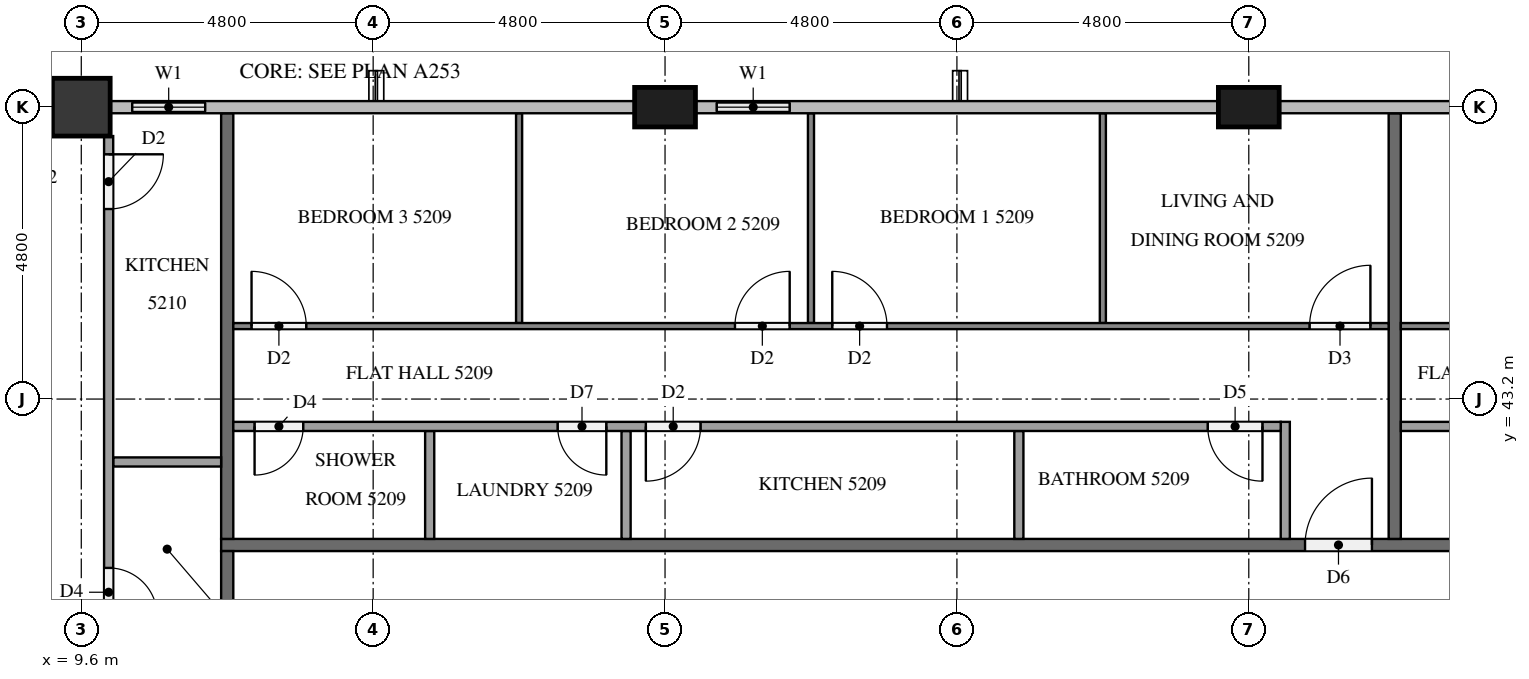
"""IFC4 building model, lengths in metres.
Left out: names, types, materials, properties, quantities, classifications, styles, units other than length and angle.
Written with IfcOpenShell. Run it as: python <this file> out.ifc"""

import sys

from ifc_helpers import new_model, si_unit, direction, frame, frame_2d, origin, origin_2d, place, context, subcontext, project, spatial, rectangle, extrude, element, fill, save


model = new_model("IFC4")
c1 = context("Model", 3, precision=1e-05, world=origin(), true_north=direction((0.0, 1.0)))
c2 = subcontext(c1, "Body", "Model", "MODEL_VIEW")
j1 = project(units=[si_unit("LENGTHUNIT", "METRE"), si_unit("PLANEANGLEUNIT", "RADIAN")], contexts=[c1])
p1 = place(None, origin())
s1 = spatial("IfcSite", under=j1, at=p1, CompositionType="ELEMENT")
p2 = place(p1, origin())
s2 = spatial("IfcBuilding", under=s1, at=p2, CompositionType="ELEMENT")
p3 = place(p2, frame((0.0, 0.0, 199.9)))
s3 = spatial("IfcBuildingStorey", under=s2, at=p3, CompositionType="ELEMENT", Elevation=199.9)
for number, where, z_axis, x_axis in (
    (1, (28.8, 48.0, 0.0), (0.0, 0.0, 1.0), (1.0, 0.0, 0.0)),
    (2, (19.2, 48.0, 0.0), (0.0, 0.0, 1.0), (1.0, 0.0, 0.0)),
):
    element("IfcColumn", number, at=place(p3, frame(where, z_axis=z_axis, x_axis=x_axis)), inside=s3, PredefinedType="COLUMN", context=c2, shape_type="SweptSolid", body=[
        extrude(rectangle(XDim=1.0, YDim=0.65, at=origin_2d()), origin(), (0.0, 0.0, 1.0), 3.1),
    ])
p4 = place(p3, frame((9.6, 48.0, 0.0), z_axis=(0.0, 0.0, 1.0), x_axis=(1.0, 0.0, 0.0)))
e3 = element("IfcColumn", 3, at=p4, inside=s3, PredefinedType="COLUMN", context=c2, shape_type="SweptSolid", body=[
    extrude(rectangle(XDim=0.95, YDim=0.95, at=origin_2d()), origin(), (0.0, 0.0, 1.0), 3.1),
])
p5 = place(p3, frame((21.6, 48.0, 0.0), z_axis=(0.0, 0.0, 1.0), x_axis=(-1.0, 0.0, 0.0)))
e4 = element("IfcWall", 4, at=p5, inside=s3, PredefinedType="SOLIDWALL", context=c2, shape_type="SweptSolid", body=[
    extrude(rectangle(XDim=1.9, YDim=0.15, at=frame_2d((0.95, 0.0))), origin(), (0.0, 0.0, 1.0), 3.1),
])
p6 = place(p5, frame((0.35, 0.0, 0.9)))
e5 = element("IfcOpeningElement", 5, at=p6, cuts=e4, PredefinedType="OPENING", context=c2, shape_type="SweptSolid", body=[
    extrude(rectangle(XDim=1.2, YDim=1.4, at=frame_2d((0.6, 0.7))), frame((0.0, 0.085, 0.0), z_axis=(0.0, -1.0, 0.0), x_axis=(1.0, 0.0, 0.0)), (0.0, 0.0, 1.0), 0.17),
])
p7 = place(p3, frame((12.0, 48.0, 0.0), z_axis=(0.0, 0.0, 1.0), x_axis=(-1.0, 0.0, 0.0)))
e6 = element("IfcWall", 6, at=p7, inside=s3, PredefinedType="SOLIDWALL", context=c2, shape_type="SweptSolid", body=[
    extrude(rectangle(XDim=1.925, YDim=0.15, at=frame_2d((0.962, 0.0))), origin(), (0.0, 0.0, 1.0), 3.1),
])
p8 = place(p7, frame((0.363, 0.0, 0.9)))
e7 = element("IfcOpeningElement", 7, at=p8, cuts=e6, PredefinedType="OPENING", context=c2, shape_type="SweptSolid", body=[
    extrude(rectangle(XDim=1.2, YDim=1.4, at=frame_2d((0.6, 0.7))), frame((0.0, 0.085, 0.0), z_axis=(0.0, -1.0, 0.0), x_axis=(1.0, 0.0, 0.0)), (0.0, 0.0, 1.0), 0.17),
])
p9 = place(p3, frame((11.9, 40.8, 0.0), z_axis=(0.0, 0.0, 1.0), x_axis=(1.0, 0.0, 0.0)))
e8 = element("IfcWall", 8, at=p9, inside=s3, PredefinedType="PARTITIONING", context=c2, shape_type="SweptSolid", body=[
    extrude(rectangle(XDim=38.6, YDim=0.2, at=frame_2d((19.3, 0.0))), origin(), (0.0, 0.0, 1.0), 3.1),
])
p10 = place(p9, frame((37.025, 0.0, 0.0)))
e9 = element("IfcOpeningElement", 9, at=p10, cuts=e8, PredefinedType="OPENING", context=c2, shape_type="SweptSolid", body=[
    extrude(rectangle(XDim=1.1, YDim=2.1, at=frame_2d((0.55, 1.05))), frame((0.0, 0.11, 0.0), z_axis=(0.0, -1.0, 0.0), x_axis=(1.0, 0.0, 0.0)), (0.0, 0.0, 1.0), 0.22),
])
p11 = place(p9, frame((17.825, 0.0, 0.0)))
e10 = element("IfcOpeningElement", 10, at=p11, cuts=e8, PredefinedType="OPENING", context=c2, shape_type="SweptSolid", body=[
    extrude(rectangle(XDim=1.1, YDim=2.1, at=frame_2d((0.55, 1.05))), frame((0.0, 0.11, 0.0), z_axis=(0.0, -1.0, 0.0), x_axis=(1.0, 0.0, 0.0)), (0.0, 0.0, 1.0), 0.22),
])
p12 = place(p3, frame((12.0, 12.1, 0.0), z_axis=(0.0, 0.0, 1.0), x_axis=(0.0, 1.0, 0.0)))
e11 = element("IfcWall", 11, at=p12, inside=s3, PredefinedType="PARTITIONING", context=c2, shape_type="SweptSolid", body=[
    extrude(rectangle(XDim=28.6, YDim=0.2, at=frame_2d((14.3, 0.0))), origin(), (0.0, 0.0, 1.0), 3.1),
])
p13 = place(p12, frame((21.925, 0.0, 0.0)))
e12 = element("IfcOpeningElement", 12, at=p13, cuts=e11, PredefinedType="OPENING", context=c2, shape_type="SweptSolid", body=[
    extrude(rectangle(XDim=1.0, YDim=2.1, at=frame_2d((0.5, 1.05))), frame((0.0, 0.11, 0.0), z_axis=(0.0, -1.0, 0.0), x_axis=(1.0, 0.0, 0.0)), (0.0, 0.0, 1.0), 0.22),
])
p14 = place(p12, frame((14.725, 0.0, 0.0)))
e13 = element("IfcOpeningElement", 13, at=p14, cuts=e11, PredefinedType="OPENING", context=c2, shape_type="SweptSolid", body=[
    extrude(rectangle(XDim=1.0, YDim=2.1, at=frame_2d((0.5, 1.05))), frame((0.0, 0.11, 0.0), z_axis=(0.0, -1.0, 0.0), x_axis=(1.0, 0.0, 0.0)), (0.0, 0.0, 1.0), 0.22),
])
p15 = place(p12, frame((12.875, 0.0, 0.0)))
e14 = element("IfcOpeningElement", 14, at=p15, cuts=e11, PredefinedType="OPENING", context=c2, shape_type="SweptSolid", body=[
    extrude(rectangle(XDim=1.0, YDim=2.1, at=frame_2d((0.5, 1.05))), frame((0.0, 0.11, 0.0), z_axis=(0.0, -1.0, 0.0), x_axis=(1.0, 0.0, 0.0)), (0.0, 0.0, 1.0), 0.22),
])
for number, where, z_axis, x_axis in (
    (15, (31.2, 47.9, 0.0), (0.0, 0.0, 1.0), (0.0, -1.0, 0.0)),
    (16, (12.0, 47.9, 0.0), (0.0, 0.0, 1.0), (0.0, -1.0, 0.0)),
):
    element("IfcWall", number, at=place(p3, frame(where, z_axis=z_axis, x_axis=x_axis)), inside=s3, PredefinedType="PARTITIONING", context=c2, shape_type="SweptSolid", body=[
        extrude(rectangle(XDim=7.0, YDim=0.2, at=frame_2d((3.5, 0.0))), origin(), (0.0, 0.0, 1.0), 3.1),
    ])
p16 = place(p3, frame((31.3, 44.4, 0.0), z_axis=(0.0, 0.0, 1.0), x_axis=(1.0, 0.0, 0.0)))
e17 = element("IfcWall", 17, at=p16, inside=s3, PredefinedType="PARTITIONING", context=c2, shape_type="SweptSolid", body=[
    extrude(rectangle(XDim=19.0, YDim=0.1, at=frame_2d((9.5, 0.0))), origin(), (0.0, 0.0, 1.0), 3.1),
])
p17 = place(p16, frame((14.65, 0.0, 0.0)))
e18 = element("IfcOpeningElement", 18, at=p17, cuts=e17, PredefinedType="OPENING", context=c2, shape_type="SweptSolid", body=[
    extrude(rectangle(XDim=0.9, YDim=2.1, at=frame_2d((0.45, 1.05))), frame((0.0, 0.06, 0.0), z_axis=(0.0, -1.0, 0.0), x_axis=(1.0, 0.0, 0.0)), (0.0, 0.0, 1.0), 0.12),
])
p18 = place(p16, frame((12.95, 0.0, 0.0)))
e19 = element("IfcOpeningElement", 19, at=p18, cuts=e17, PredefinedType="OPENING", context=c2, shape_type="SweptSolid", body=[
    extrude(rectangle(XDim=1.0, YDim=2.1, at=frame_2d((0.5, 1.05))), frame((0.0, 0.06, 0.0), z_axis=(0.0, -1.0, 0.0), x_axis=(1.0, 0.0, 0.0)), (0.0, 0.0, 1.0), 0.12),
])
p19 = place(p16, frame((5.05, 0.0, 0.0)))
e20 = element("IfcOpeningElement", 20, at=p19, cuts=e17, PredefinedType="OPENING", context=c2, shape_type="SweptSolid", body=[
    extrude(rectangle(XDim=0.9, YDim=2.1, at=frame_2d((0.45, 1.05))), frame((0.0, 0.06, 0.0), z_axis=(0.0, -1.0, 0.0), x_axis=(1.0, 0.0, 0.0)), (0.0, 0.0, 1.0), 0.12),
])
p20 = place(p16, frame((3.45, 0.0, 0.0)))
e21 = element("IfcOpeningElement", 21, at=p20, cuts=e17, PredefinedType="OPENING", context=c2, shape_type="SweptSolid", body=[
    extrude(rectangle(XDim=0.9, YDim=2.1, at=frame_2d((0.45, 1.05))), frame((0.0, 0.06, 0.0), z_axis=(0.0, -1.0, 0.0), x_axis=(1.0, 0.0, 0.0)), (0.0, 0.0, 1.0), 0.12),
])
p21 = place(p3, frame((48.525, 42.75, 0.0), z_axis=(0.0, 0.0, 1.0), x_axis=(-1.0, 0.0, 0.0)))
e22 = element("IfcWall", 22, at=p21, inside=s3, PredefinedType="PARTITIONING", context=c2, shape_type="SweptSolid", body=[
    extrude(rectangle(XDim=17.225, YDim=0.15, at=frame_2d((8.612, 0.0))), origin(), (0.0, 0.0, 1.0), 3.1),
])
p22 = place(p21, frame((3.081, 0.0, 0.0)))
e23 = element("IfcOpeningElement", 23, at=p22, cuts=e22, PredefinedType="OPENING", context=c2, shape_type="SweptSolid", body=[
    extrude(rectangle(XDim=0.9, YDim=2.1, at=frame_2d((0.45, 1.05))), frame((0.0, 0.085, 0.0), z_axis=(0.0, -1.0, 0.0), x_axis=(1.0, 0.0, 0.0)), (0.0, 0.0, 1.0), 0.17),
])
p23 = place(p21, frame((4.631, 0.0, 0.0)))
e24 = element("IfcOpeningElement", 24, at=p23, cuts=e22, PredefinedType="OPENING", context=c2, shape_type="SweptSolid", body=[
    extrude(rectangle(XDim=0.8, YDim=2.1, at=frame_2d((0.4, 1.05))), frame((0.0, 0.085, 0.0), z_axis=(0.0, -1.0, 0.0), x_axis=(1.0, 0.0, 0.0)), (0.0, 0.0, 1.0), 0.17),
])
p24 = place(p21, frame((9.641, 0.0, 0.0)))
e25 = element("IfcOpeningElement", 25, at=p24, cuts=e22, PredefinedType="OPENING", context=c2, shape_type="SweptSolid", body=[
    extrude(rectangle(XDim=0.8, YDim=2.1, at=frame_2d((0.4, 1.05))), frame((0.0, 0.085, 0.0), z_axis=(0.0, -1.0, 0.0), x_axis=(1.0, 0.0, 0.0)), (0.0, 0.0, 1.0), 0.17),
])
p25 = place(p21, frame((11.091, 0.0, 0.0)))
e26 = element("IfcOpeningElement", 26, at=p25, cuts=e22, PredefinedType="OPENING", context=c2, shape_type="SweptSolid", body=[
    extrude(rectangle(XDim=0.9, YDim=2.1, at=frame_2d((0.45, 1.05))), frame((0.0, 0.085, 0.0), z_axis=(0.0, -1.0, 0.0), x_axis=(1.0, 0.0, 0.0)), (0.0, 0.0, 1.0), 0.17),
])
for number, where, z_axis, x_axis in (
    (27, (26.4, 44.45, 0.0), (0.0, 0.0, 1.0), (0.0, 1.0, 0.0)),
    (28, (21.6, 44.45, 0.0), (0.0, 0.0, 1.0), (0.0, 1.0, 0.0)),
    (29, (16.8, 44.45, 0.0), (0.0, 0.0, 1.0), (0.0, 1.0, 0.0)),
):
    element("IfcWall", number, at=place(p3, frame(where, z_axis=z_axis, x_axis=x_axis)), inside=s3, PredefinedType="PARTITIONING", context=c2, shape_type="SweptSolid", body=[
        extrude(rectangle(XDim=3.45, YDim=0.1, at=frame_2d((1.725, 0.0))), origin(), (0.0, 0.0, 1.0), 3.1),
    ])
p26 = place(p3, frame((12.1, 44.4, 0.0), z_axis=(0.0, 0.0, 1.0), x_axis=(1.0, 0.0, 0.0)))
e30 = element("IfcWall", 30, at=p26, inside=s3, PredefinedType="PARTITIONING", context=c2, shape_type="SweptSolid", body=[
    extrude(rectangle(XDim=19.0, YDim=0.1, at=frame_2d((9.5, 0.0))), origin(), (0.0, 0.0, 1.0), 3.1),
])
p27 = place(p26, frame((17.7, 0.0, 0.0)))
e31 = element("IfcOpeningElement", 31, at=p27, cuts=e30, PredefinedType="OPENING", context=c2, shape_type="SweptSolid", body=[
    extrude(rectangle(XDim=1.0, YDim=2.1, at=frame_2d((0.5, 1.05))), frame((0.0, 0.06, 0.0), z_axis=(0.0, -1.0, 0.0), x_axis=(1.0, 0.0, 0.0)), (0.0, 0.0, 1.0), 0.12),
])
p28 = place(p26, frame((9.85, 0.0, 0.0)))
e32 = element("IfcOpeningElement", 32, at=p28, cuts=e30, PredefinedType="OPENING", context=c2, shape_type="SweptSolid", body=[
    extrude(rectangle(XDim=0.9, YDim=2.1, at=frame_2d((0.45, 1.05))), frame((0.0, 0.06, 0.0), z_axis=(0.0, -1.0, 0.0), x_axis=(1.0, 0.0, 0.0)), (0.0, 0.0, 1.0), 0.12),
])
p29 = place(p26, frame((8.25, 0.0, 0.0)))
e33 = element("IfcOpeningElement", 33, at=p29, cuts=e30, PredefinedType="OPENING", context=c2, shape_type="SweptSolid", body=[
    extrude(rectangle(XDim=0.9, YDim=2.1, at=frame_2d((0.45, 1.05))), frame((0.0, 0.06, 0.0), z_axis=(0.0, -1.0, 0.0), x_axis=(1.0, 0.0, 0.0)), (0.0, 0.0, 1.0), 0.12),
])
p30 = place(p26, frame((0.3, 0.0, 0.0)))
e34 = element("IfcOpeningElement", 34, at=p30, cuts=e30, PredefinedType="OPENING", context=c2, shape_type="SweptSolid", body=[
    extrude(rectangle(XDim=0.9, YDim=2.1, at=frame_2d((0.45, 1.05))), frame((0.0, 0.06, 0.0), z_axis=(0.0, -1.0, 0.0), x_axis=(1.0, 0.0, 0.0)), (0.0, 0.0, 1.0), 0.12),
])
for number, where, z_axis, x_axis in (
    (35, (25.019, 40.9, 0.0), (0.0, 0.0, 1.0), (0.0, 1.0, 0.0)),
    (36, (18.559, 40.9, 0.0), (0.0, 0.0, 1.0), (0.0, 1.0, 0.0)),
    (37, (15.33, 40.9, 0.0), (0.0, 0.0, 1.0), (0.0, 1.0, 0.0)),
):
    element("IfcWall", number, at=place(p3, frame(where, z_axis=z_axis, x_axis=x_axis)), inside=s3, PredefinedType="PARTITIONING", context=c2, shape_type="SweptSolid", body=[
        extrude(rectangle(XDim=1.775, YDim=0.15, at=frame_2d((0.888, 0.0))), origin(), (0.0, 0.0, 1.0), 3.1),
    ])
p31 = place(p3, frame((29.4, 40.9, 0.0), z_axis=(0.0, 0.0, 1.0), x_axis=(0.0, 1.0, 0.0)))
e38 = element("IfcWall", 38, at=p31, inside=s3, PredefinedType="PARTITIONING", context=c2, shape_type="SweptSolid", body=[
    extrude(rectangle(XDim=1.925, YDim=0.15, at=frame_2d((0.962, 0.0))), origin(), (0.0, 0.0, 1.0), 3.1),
])
p32 = place(p3, frame((29.325, 42.75, 0.0), z_axis=(0.0, 0.0, 1.0), x_axis=(-1.0, 0.0, 0.0)))
e39 = element("IfcWall", 39, at=p32, inside=s3, PredefinedType="PARTITIONING", context=c2, shape_type="SweptSolid", body=[
    extrude(rectangle(XDim=17.225, YDim=0.15, at=frame_2d((8.612, 0.0))), origin(), (0.0, 0.0, 1.0), 3.1),
])
p33 = place(p32, frame((0.3, 0.0, 0.0)))
e40 = element("IfcOpeningElement", 40, at=p33, cuts=e39, PredefinedType="OPENING", context=c2, shape_type="SweptSolid", body=[
    extrude(rectangle(XDim=0.9, YDim=2.1, at=frame_2d((0.45, 1.05))), frame((0.0, 0.085, 0.0), z_axis=(0.0, -1.0, 0.0), x_axis=(1.0, 0.0, 0.0)), (0.0, 0.0, 1.0), 0.17),
])
p34 = place(p32, frame((9.541, 0.0, 0.0)))
e41 = element("IfcOpeningElement", 41, at=p34, cuts=e39, PredefinedType="OPENING", context=c2, shape_type="SweptSolid", body=[
    extrude(rectangle(XDim=0.9, YDim=2.1, at=frame_2d((0.45, 1.05))), frame((0.0, 0.085, 0.0), z_axis=(0.0, -1.0, 0.0), x_axis=(1.0, 0.0, 0.0)), (0.0, 0.0, 1.0), 0.17),
])
p35 = place(p32, frame((11.091, 0.0, 0.0)))
e42 = element("IfcOpeningElement", 42, at=p35, cuts=e39, PredefinedType="OPENING", context=c2, shape_type="SweptSolid", body=[
    extrude(rectangle(XDim=0.8, YDim=2.1, at=frame_2d((0.4, 1.05))), frame((0.0, 0.085, 0.0), z_axis=(0.0, -1.0, 0.0), x_axis=(1.0, 0.0, 0.0)), (0.0, 0.0, 1.0), 0.17),
])
p36 = place(p32, frame((16.075, 0.0, 0.0)))
e43 = element("IfcOpeningElement", 43, at=p36, cuts=e39, PredefinedType="OPENING", context=c2, shape_type="SweptSolid", body=[
    extrude(rectangle(XDim=0.8, YDim=2.1, at=frame_2d((0.4, 1.05))), frame((0.0, 0.085, 0.0), z_axis=(0.0, -1.0, 0.0), x_axis=(1.0, 0.0, 0.0)), (0.0, 0.0, 1.0), 0.17),
])
p37 = place(p3, frame((11.9, 42.165, 0.0), z_axis=(0.0, 0.0, 1.0), x_axis=(-1.0, 0.0, 0.0)))
e44 = element("IfcWall", 44, at=p37, inside=s3, PredefinedType="PARTITIONING", context=c2, shape_type="SweptSolid", body=[
    extrude(rectangle(XDim=1.775, YDim=0.15, at=frame_2d((0.887, 0.0))), origin(), (0.0, 0.0, 1.0), 3.1),
])
p38 = place(p3, frame((10.05, 47.525, 0.0), z_axis=(0.0, 0.0, 1.0), x_axis=(0.0, -1.0, 0.0)))
e45 = element("IfcWall", 45, at=p38, inside=s3, PredefinedType="PARTITIONING", context=c2, shape_type="SweptSolid", body=[
    extrude(rectangle(XDim=12.05, YDim=0.15, at=frame_2d((6.025, 0.0))), origin(), (0.0, 0.0, 1.0), 3.1),
])
p39 = place(p38, frame((8.552, 0.0, 0.0)))
e46 = element("IfcOpeningElement", 46, at=p39, cuts=e45, PredefinedType="OPENING", context=c2, shape_type="SweptSolid", body=[
    extrude(rectangle(XDim=0.9, YDim=2.1, at=frame_2d((0.45, 1.05))), frame((0.0, 0.085, 0.0), z_axis=(0.0, -1.0, 0.0), x_axis=(1.0, 0.0, 0.0)), (0.0, 0.0, 1.0), 0.17),
])
p40 = place(p38, frame((7.102, 0.0, 0.0)))
e47 = element("IfcOpeningElement", 47, at=p40, cuts=e45, PredefinedType="OPENING", context=c2, shape_type="SweptSolid", body=[
    extrude(rectangle(XDim=0.8, YDim=2.1, at=frame_2d((0.4, 1.05))), frame((0.0, 0.085, 0.0), z_axis=(0.0, -1.0, 0.0), x_axis=(1.0, 0.0, 0.0)), (0.0, 0.0, 1.0), 0.17),
])
p41 = place(p38, frame((0.3, 0.0, 0.0)))
e48 = element("IfcOpeningElement", 48, at=p41, cuts=e45, PredefinedType="OPENING", context=c2, shape_type="SweptSolid", body=[
    extrude(rectangle(XDim=0.9, YDim=2.1, at=frame_2d((0.45, 1.05))), frame((0.0, 0.085, 0.0), z_axis=(0.0, -1.0, 0.0), x_axis=(1.0, 0.0, 0.0)), (0.0, 0.0, 1.0), 0.17),
])
p42 = place(p6, origin())
e49 = element("IfcWindow", 49, at=p42, inside=s3, PartitioningType="SINGLE_PANEL", PredefinedType="WINDOW", context=c2, shape_type="SweptSolid", body=[
    extrude(rectangle(XDim=1.2, YDim=1.4, at=frame_2d((0.6, 0.7))), frame((0.0, 0.03, 0.0), z_axis=(0.0, -1.0, 0.0), x_axis=(1.0, 0.0, 0.0)), (0.0, 0.0, 1.0), 0.06),
])
fill(e5, e49)
p43 = place(p8, origin())
e50 = element("IfcWindow", 50, at=p43, inside=s3, PartitioningType="SINGLE_PANEL", PredefinedType="WINDOW", context=c2, shape_type="SweptSolid", body=[
    extrude(rectangle(XDim=1.2, YDim=1.4, at=frame_2d((0.6, 0.7))), frame((0.0, 0.03, 0.0), z_axis=(0.0, -1.0, 0.0), x_axis=(1.0, 0.0, 0.0)), (0.0, 0.0, 1.0), 0.06),
])
fill(e7, e50)
p44 = place(p11, origin())
e51 = element("IfcDoor", 51, at=p44, inside=s3, OperationType="SINGLE_SWING_RIGHT", PredefinedType="DOOR", context=c2, shape_type="SweptSolid", body=[
    extrude(rectangle(XDim=1.1, YDim=2.1, at=frame_2d((0.55, 1.05))), frame((0.0, 0.025, 0.0), z_axis=(0.0, -1.0, 0.0), x_axis=(1.0, 0.0, 0.0)), (0.0, 0.0, 1.0), 0.05),
])
fill(e10, e51)
p45 = place(p27, origin())
e52 = element("IfcDoor", 52, at=p45, inside=s3, OperationType="SINGLE_SWING_RIGHT", PredefinedType="DOOR", context=c2, shape_type="SweptSolid", body=[
    extrude(rectangle(XDim=1.0, YDim=2.1, at=frame_2d((0.5, 1.05))), frame((0.0, 0.025, 0.0), z_axis=(0.0, -1.0, 0.0), x_axis=(1.0, 0.0, 0.0)), (0.0, 0.0, 1.0), 0.05),
])
fill(e31, e52)
p46 = place(p28, origin())
e53 = element("IfcDoor", 53, at=p46, inside=s3, OperationType="SINGLE_SWING_LEFT", PredefinedType="DOOR", context=c2, shape_type="SweptSolid", body=[
    extrude(rectangle(XDim=0.9, YDim=2.1, at=frame_2d((0.45, 1.05))), frame((0.0, 0.025, 0.0), z_axis=(0.0, -1.0, 0.0), x_axis=(1.0, 0.0, 0.0)), (0.0, 0.0, 1.0), 0.05),
])
fill(e32, e53)
p47 = place(p29, origin())
e54 = element("IfcDoor", 54, at=p47, inside=s3, OperationType="SINGLE_SWING_RIGHT", PredefinedType="DOOR", context=c2, shape_type="SweptSolid", body=[
    extrude(rectangle(XDim=0.9, YDim=2.1, at=frame_2d((0.45, 1.05))), frame((0.0, 0.025, 0.0), z_axis=(0.0, -1.0, 0.0), x_axis=(1.0, 0.0, 0.0)), (0.0, 0.0, 1.0), 0.05),
])
fill(e33, e54)
p48 = place(p30, origin())
e55 = element("IfcDoor", 55, at=p48, inside=s3, OperationType="SINGLE_SWING_LEFT", PredefinedType="DOOR", context=c2, shape_type="SweptSolid", body=[
    extrude(rectangle(XDim=0.9, YDim=2.1, at=frame_2d((0.45, 1.05))), frame((0.0, 0.025, 0.0), z_axis=(0.0, -1.0, 0.0), x_axis=(1.0, 0.0, 0.0)), (0.0, 0.0, 1.0), 0.05),
])
fill(e34, e55)
p49 = place(p33, origin())
e56 = element("IfcDoor", 56, at=p49, inside=s3, OperationType="SINGLE_SWING_LEFT", PredefinedType="DOOR", context=c2, shape_type="SweptSolid", body=[
    extrude(rectangle(XDim=0.9, YDim=2.1, at=frame_2d((0.45, 1.05))), frame((0.0, 0.025, 0.0), z_axis=(0.0, -1.0, 0.0), x_axis=(1.0, 0.0, 0.0)), (0.0, 0.0, 1.0), 0.05),
])
fill(e40, e56)
p50 = place(p34, origin())
e57 = element("IfcDoor", 57, at=p50, inside=s3, OperationType="SINGLE_SWING_RIGHT", PredefinedType="DOOR", context=c2, shape_type="SweptSolid", body=[
    extrude(rectangle(XDim=0.9, YDim=2.1, at=frame_2d((0.45, 1.05))), frame((0.0, 0.025, 0.0), z_axis=(0.0, -1.0, 0.0), x_axis=(1.0, 0.0, 0.0)), (0.0, 0.0, 1.0), 0.05),
])
fill(e41, e57)
p51 = place(p35, origin())
e58 = element("IfcDoor", 58, at=p51, inside=s3, OperationType="SINGLE_SWING_LEFT", PredefinedType="DOOR", context=c2, shape_type="SweptSolid", body=[
    extrude(rectangle(XDim=0.8, YDim=2.1, at=frame_2d((0.4, 1.05))), frame((0.0, 0.025, 0.0), z_axis=(0.0, -1.0, 0.0), x_axis=(1.0, 0.0, 0.0)), (0.0, 0.0, 1.0), 0.05),
])
fill(e42, e58)
p52 = place(p36, origin())
e59 = element("IfcDoor", 59, at=p52, inside=s3, OperationType="SINGLE_SWING_RIGHT", PredefinedType="DOOR", context=c2, shape_type="SweptSolid", body=[
    extrude(rectangle(XDim=0.8, YDim=2.1, at=frame_2d((0.4, 1.05))), frame((0.0, 0.025, 0.0), z_axis=(0.0, -1.0, 0.0), x_axis=(1.0, 0.0, 0.0)), (0.0, 0.0, 1.0), 0.05),
])
fill(e43, e59)
p53 = place(p40, origin())
e60 = element("IfcDoor", 60, at=p53, inside=s3, OperationType="SINGLE_SWING_RIGHT", PredefinedType="DOOR", context=c2, shape_type="SweptSolid", body=[
    extrude(rectangle(XDim=0.8, YDim=2.1, at=frame_2d((0.4, 1.05))), frame((0.0, 0.025, 0.0), z_axis=(0.0, -1.0, 0.0), x_axis=(1.0, 0.0, 0.0)), (0.0, 0.0, 1.0), 0.05),
])
fill(e47, e60)
p54 = place(p41, origin())
e61 = element("IfcDoor", 61, at=p54, inside=s3, OperationType="SINGLE_SWING_LEFT", PredefinedType="DOOR", context=c2, shape_type="SweptSolid", body=[
    extrude(rectangle(XDim=0.9, YDim=2.1, at=frame_2d((0.45, 1.05))), frame((0.0, 0.025, 0.0), z_axis=(0.0, -1.0, 0.0), x_axis=(1.0, 0.0, 0.0)), (0.0, 0.0, 1.0), 0.05),
])
fill(e48, e61)
save(model, sys.argv[1])
